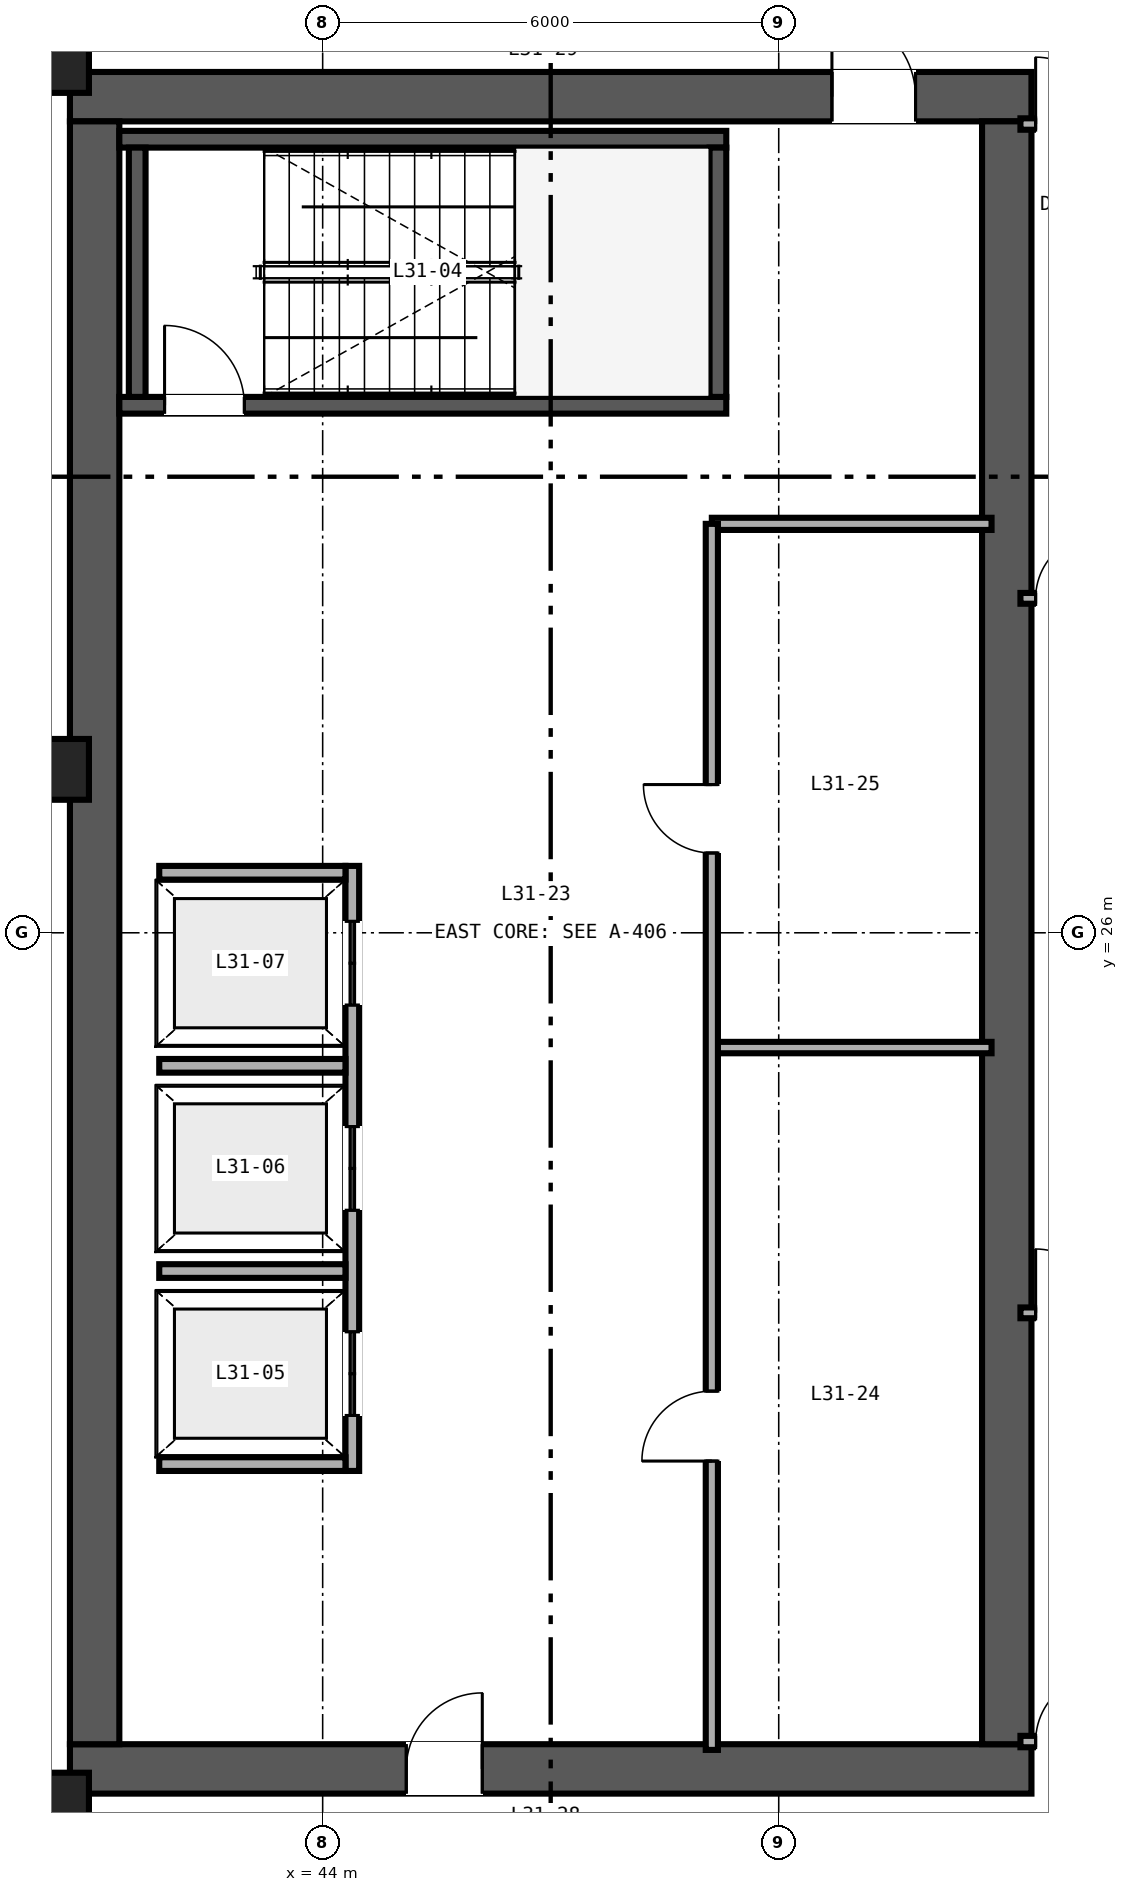
"""IFC4 building model, lengths in metres.
Left out: names, types, materials, properties, quantities, classifications, styles, units other than length and angle.
Written with IfcOpenShell. Run it as: python <this file> out.ifc"""

import sys

from ifc_helpers import new_model, si_unit, direction, frame, frame_2d, origin, origin_2d, place, context, subcontext, project, spatial, rectangle, hollow_rectangle, extrude, source, transform, mapped, element, fill, save


model = new_model("IFC4")
c1 = context("Model", 3, precision=1e-05, world=origin(), true_north=direction((0.0, 1.0)))
c2 = subcontext(c1, "Body", "Model", "MODEL_VIEW")
j1 = project(units=[si_unit("LENGTHUNIT", "METRE"), si_unit("PLANEANGLEUNIT", "RADIAN")], contexts=[c1])
p1 = place(None, origin())
s1 = spatial("IfcSite", under=j1, at=p1, CompositionType="ELEMENT")
p2 = place(p1, origin())
s2 = spatial("IfcBuilding", under=s1, at=p2, CompositionType="ELEMENT")
p3 = place(p2, frame((0.0, 0.0, 126.0)))
s3 = spatial("IfcBuildingStorey", under=s2, at=p3, CompositionType="ELEMENT", Elevation=126.0)
p4 = place(p3, frame((40.675, 15.0, 0.0), z_axis=(0.0, 0.0, 1.0), x_axis=(1.0, 0.0, 0.0)))
e1 = element("IfcWall", 1, at=p4, inside=s3, PredefinedType="SHEAR", context=c2, shape_type="SweptSolid", body=[
    extrude(rectangle(XDim=12.65, YDim=0.65, at=frame_2d((6.325, 0.0))), origin(), (0.0, 0.0, 1.0), 3.36),
])
p5 = place(p4, frame((4.425, 0.0, 0.0)))
e2 = element("IfcOpeningElement", 2, at=p5, cuts=e1, PredefinedType="OPENING", context=c2, shape_type="SweptSolid", body=[
    extrude(rectangle(XDim=1.0, YDim=2.15, at=frame_2d((0.5, 1.075))), frame((0.0, 0.335, 0.0), z_axis=(0.0, -1.0, 0.0), x_axis=(1.0, 0.0, 0.0)), (0.0, 0.0, 1.0), 0.67),
])
p6 = place(p3, frame((40.675, 37.0, 0.0), z_axis=(0.0, 0.0, 1.0), x_axis=(1.0, 0.0, 0.0)))
e3 = element("IfcWall", 3, at=p6, inside=s3, PredefinedType="SHEAR", context=c2, shape_type="SweptSolid", body=[
    extrude(rectangle(XDim=12.65, YDim=0.65, at=frame_2d((6.325, 0.0))), origin(), (0.0, 0.0, 1.0), 3.36),
])
p7 = place(p6, frame((10.025, 0.0, 0.0)))
e4 = element("IfcOpeningElement", 4, at=p7, cuts=e3, PredefinedType="OPENING", context=c2, shape_type="SweptSolid", body=[
    extrude(rectangle(XDim=1.1, YDim=2.15, at=frame_2d((0.55, 1.075))), frame((0.0, 0.335, 0.0), z_axis=(0.0, -1.0, 0.0), x_axis=(1.0, 0.0, 0.0)), (0.0, 0.0, 1.0), 0.67),
])
for number, where, z_axis, x_axis in (
    (5, (41.0, 15.325, 0.0), (0.0, 0.0, 1.0), (0.0, 1.0, 0.0)),
    (6, (53.0, 15.325, 0.0), (0.0, 0.0, 1.0), (0.0, 1.0, 0.0)),
):
    element("IfcWall", number, at=place(p3, frame(where, z_axis=z_axis, x_axis=x_axis)), inside=s3, PredefinedType="SHEAR", context=c2, shape_type="SweptSolid", body=[
        extrude(rectangle(XDim=21.35, YDim=0.65, at=frame_2d((10.675, 0.0))), origin(), (0.0, 0.0, 1.0), 3.36),
    ])
p8 = place(p3, frame((41.325, 32.94, 0.0), z_axis=(0.0, 0.0, 1.0), x_axis=(1.0, 0.0, 0.0)))
e7 = element("IfcWall", 7, at=p8, inside=s3, PredefinedType="SHEAR", context=c2, shape_type="SweptSolid", body=[
    extrude(rectangle(XDim=7.985, YDim=0.22, at=frame_2d((3.993, 0.0))), origin(), (0.0, 0.0, 1.0), 3.4),
])
p9 = place(p8, frame((0.595, 0.0, 0.0)))
e8 = element("IfcOpeningElement", 8, at=p9, cuts=e7, PredefinedType="OPENING", context=c2, shape_type="SweptSolid", body=[
    extrude(rectangle(XDim=1.05, YDim=2.15, at=frame_2d((0.525, 1.075))), frame((0.0, 0.12, 0.0), z_axis=(0.0, -1.0, 0.0), x_axis=(1.0, 0.0, 0.0)), (0.0, 0.0, 1.0), 0.24),
])
p10 = place(p3, frame((41.325, 36.44, 0.0), z_axis=(0.0, 0.0, 1.0), x_axis=(1.0, 0.0, 0.0)))
e9 = element("IfcWall", 9, at=p10, inside=s3, PredefinedType="SHEAR", context=c2, shape_type="SweptSolid", body=[
    extrude(rectangle(XDim=7.985, YDim=0.22, at=frame_2d((3.993, 0.0))), origin(), (0.0, 0.0, 1.0), 3.4),
])
for number, where, z_axis, x_axis in (
    (10, (41.56, 33.05, 0.0), (0.0, 0.0, 1.0), (0.0, 1.0, 0.0)),
    (11, (49.2, 33.05, 0.0), (0.0, 0.0, 1.0), (0.0, 1.0, 0.0)),
):
    element("IfcWall", number, at=place(p3, frame(where, z_axis=z_axis, x_axis=x_axis)), inside=s3, PredefinedType="SHEAR", context=c2, shape_type="SweptSolid", body=[
        extrude(rectangle(XDim=3.28, YDim=0.22, at=frame_2d((1.64, 0.0))), origin(), (0.0, 0.0, 1.0), 3.4),
    ])
m1 = source(origin(), c2, "Body", "SweptSolid", [
    extrude(hollow_rectangle(XDim=0.85, YDim=0.8, WallThickness=0.032, at=origin_2d()), origin(), (0.0, 0.0, 1.0), 3.36),
])
for number, where, z_axis, x_axis in (
    (12, (40.5, 14.55, 0.0), (0.0, 0.0, 1.0), (1.0, 0.0, 0.0)),
    (13, (40.5, 28.15, 0.0), (0.0, 0.0, 1.0), (1.0, 0.0, 0.0)),
    (14, (40.5, 37.45, 0.0), (0.0, 0.0, 1.0), (1.0, 0.0, 0.0)),
):
    element("IfcColumn", number, at=place(p3, frame(where, z_axis=z_axis, x_axis=x_axis)), inside=s3, PredefinedType="COLUMN", context=c2, shape_type="MappedRepresentation", body=[
        mapped(m1, transform((0.0, 0.0, 0.0), scale=1.0)),
    ])
p11 = place(p3, frame((44.39, 18.92, 0.0), z_axis=(0.0, 0.0, 1.0), x_axis=(0.0, 1.0, 0.0)))
e15 = element("IfcWall", 15, at=p11, inside=s3, PredefinedType="SOLIDWALL", context=c2, shape_type="SweptSolid", body=[
    extrude(rectangle(XDim=7.96, YDim=0.18, at=frame_2d((3.98, 0.0))), origin(), (0.0, 0.0, 1.0), 3.36),
])
p12 = place(p11, frame((0.73, 0.0, 0.0)))
e16 = element("IfcOpeningElement", 16, at=p12, cuts=e15, PredefinedType="OPENING", context=c2, shape_type="SweptSolid", body=[
    extrude(rectangle(XDim=1.1, YDim=2.2, at=frame_2d((0.55, 1.1))), frame((0.0, 0.1, 0.0), z_axis=(0.0, -1.0, 0.0), x_axis=(1.0, 0.0, 0.0)), (0.0, 0.0, 1.0), 0.2),
])
p13 = place(p11, frame((3.43, 0.0, 0.0)))
e17 = element("IfcOpeningElement", 17, at=p13, cuts=e15, PredefinedType="OPENING", context=c2, shape_type="SweptSolid", body=[
    extrude(rectangle(XDim=1.1, YDim=2.2, at=frame_2d((0.55, 1.1))), frame((0.0, 0.1, 0.0), z_axis=(0.0, -1.0, 0.0), x_axis=(1.0, 0.0, 0.0)), (0.0, 0.0, 1.0), 0.2),
])
p14 = place(p11, frame((6.13, 0.0, 0.0)))
e18 = element("IfcOpeningElement", 18, at=p14, cuts=e15, PredefinedType="OPENING", context=c2, shape_type="SweptSolid", body=[
    extrude(rectangle(XDim=1.1, YDim=2.2, at=frame_2d((0.55, 1.1))), frame((0.0, 0.1, 0.0), z_axis=(0.0, -1.0, 0.0), x_axis=(1.0, 0.0, 0.0)), (0.0, 0.0, 1.0), 0.2),
])
for number, where, z_axis, x_axis in (
    (19, (41.85, 19.01, 0.0), (0.0, 0.0, 1.0), (1.0, 0.0, 0.0)),
    (20, (41.85, 26.79, 0.0), (0.0, 0.0, 1.0), (1.0, 0.0, 0.0)),
    (21, (41.85, 21.55, 0.0), (0.0, 0.0, 1.0), (1.0, 0.0, 0.0)),
    (22, (41.85, 24.25, 0.0), (0.0, 0.0, 1.0), (1.0, 0.0, 0.0)),
):
    element("IfcWall", number, at=place(p3, frame(where, z_axis=z_axis, x_axis=x_axis)), inside=s3, PredefinedType="SOLIDWALL", context=c2, shape_type="SweptSolid", body=[
        extrude(rectangle(XDim=2.45, YDim=0.18, at=frame_2d((1.225, 0.0))), origin(), (0.0, 0.0, 1.0), 3.36),
    ])
p15 = place(p3, frame((49.12, 31.38, 0.0), z_axis=(0.0, 0.0, 1.0), x_axis=(1.0, 0.0, 0.0)))
e23 = element("IfcWall", 23, at=p15, inside=s3, PredefinedType="PARTITIONING", context=c2, shape_type="SweptSolid", body=[
    extrude(rectangle(XDim=3.68, YDim=0.16, at=frame_2d((1.84, 0.0))), origin(), (0.0, 0.0, 1.0), 2.36),
])
p16 = place(p3, frame((49.12, 24.49, 0.0), z_axis=(0.0, 0.0, 1.0), x_axis=(1.0, 0.0, 0.0)))
e24 = element("IfcWall", 24, at=p16, inside=s3, PredefinedType="PARTITIONING", context=c2, shape_type="SweptSolid", body=[
    extrude(rectangle(XDim=3.68, YDim=0.15, at=frame_2d((1.84, 0.0))), origin(), (0.0, 0.0, 1.0), 3.36),
])
p17 = place(p3, frame((49.12, 15.25, 0.0), z_axis=(0.0, 0.0, 1.0), x_axis=(0.0, 1.0, 0.0)))
e25 = element("IfcWall", 25, at=p17, inside=s3, PredefinedType="PARTITIONING", context=c2, shape_type="SweptSolid", body=[
    extrude(rectangle(XDim=16.13, YDim=0.16, at=frame_2d((8.065, 0.0))), origin(), (0.0, 0.0, 1.0), 2.36),
])
p18 = place(p17, frame((3.8, 0.0, 0.0)))
e26 = element("IfcOpeningElement", 26, at=p18, cuts=e25, PredefinedType="OPENING", context=c2, shape_type="SweptSolid", body=[
    extrude(rectangle(XDim=0.92, YDim=2.15, at=frame_2d((0.46, 1.075))), frame((0.0, 0.09, 0.0), z_axis=(0.0, -1.0, 0.0), x_axis=(1.0, 0.0, 0.0)), (0.0, 0.0, 1.0), 0.18),
])
p19 = place(p17, frame((11.8, 0.0, 0.0)))
e27 = element("IfcOpeningElement", 27, at=p19, cuts=e25, PredefinedType="OPENING", context=c2, shape_type="SweptSolid", body=[
    extrude(rectangle(XDim=0.9, YDim=2.15, at=frame_2d((0.45, 1.075))), frame((0.0, 0.09, 0.0), z_axis=(0.0, -1.0, 0.0), x_axis=(1.0, 0.0, 0.0)), (0.0, 0.0, 1.0), 0.18),
])
p20 = place(p3, frame((53.18, 15.36, 0.0), z_axis=(0.0, 0.0, 1.0), x_axis=(1.0, 0.0, 0.0)))
e28 = element("IfcWall", 28, at=p20, inside=s3, PredefinedType="PARTITIONING", context=c2, shape_type="SweptSolid", body=[
    extrude(rectangle(XDim=2.66, YDim=0.15, at=frame_2d((1.33, 0.0))), origin(), (0.0, 0.0, 1.0), 2.581),
])
p21 = place(p20, frame((0.2, 0.0, 0.0)))
e29 = element("IfcOpeningElement", 29, at=p21, cuts=e28, PredefinedType="OPENING", context=c2, shape_type="SweptSolid", body=[
    extrude(rectangle(XDim=0.88, YDim=2.15, at=frame_2d((0.44, 1.075))), frame((0.0, 0.085, 0.0), z_axis=(0.0, -1.0, 0.0), x_axis=(1.0, 0.0, 0.0)), (0.0, 0.0, 1.0), 0.17),
])
p22 = place(p3, frame((53.18, 36.64, 0.0), z_axis=(0.0, 0.0, 1.0), x_axis=(1.0, 0.0, 0.0)))
e30 = element("IfcWall", 30, at=p22, inside=s3, PredefinedType="PARTITIONING", context=c2, shape_type="SweptSolid", body=[
    extrude(rectangle(XDim=2.66, YDim=0.15, at=frame_2d((1.33, 0.0))), origin(), (0.0, 0.0, 1.0), 2.743),
])
p23 = place(p22, frame((0.2, 0.0, 0.0)))
e31 = element("IfcOpeningElement", 31, at=p23, cuts=e30, PredefinedType="OPENING", context=c2, shape_type="SweptSolid", body=[
    extrude(rectangle(XDim=0.88, YDim=2.15, at=frame_2d((0.44, 1.075))), frame((0.0, 0.085, 0.0), z_axis=(0.0, -1.0, 0.0), x_axis=(1.0, 0.0, 0.0)), (0.0, 0.0, 1.0), 0.17),
])
p24 = place(p3, frame((53.18, 21.0, 0.0), z_axis=(0.0, 0.0, 1.0), x_axis=(1.0, 0.0, 0.0)))
e32 = element("IfcWall", 32, at=p24, inside=s3, PredefinedType="PARTITIONING", context=c2, shape_type="SweptSolid", body=[
    extrude(rectangle(XDim=2.66, YDim=0.142, at=frame_2d((1.33, 0.0))), origin(), (0.0, 0.0, 1.0), 2.581),
])
p25 = place(p24, frame((0.2, 0.0, 0.0)))
e33 = element("IfcOpeningElement", 33, at=p25, cuts=e32, PredefinedType="OPENING", context=c2, shape_type="SweptSolid", body=[
    extrude(rectangle(XDim=0.84, YDim=2.1, at=frame_2d((0.42, 1.05))), frame((0.0, 0.081, 0.0), z_axis=(0.0, -1.0, 0.0), x_axis=(1.0, 0.0, 0.0)), (0.0, 0.0, 1.0), 0.162),
])
p26 = place(p3, frame((53.18, 30.4, 0.0), z_axis=(0.0, 0.0, 1.0), x_axis=(1.0, 0.0, 0.0)))
e34 = element("IfcWall", 34, at=p26, inside=s3, PredefinedType="PARTITIONING", context=c2, shape_type="SweptSolid", body=[
    extrude(rectangle(XDim=2.66, YDim=0.142, at=frame_2d((1.33, 0.0))), origin(), (0.0, 0.0, 1.0), 2.743),
])
p27 = place(p26, frame((0.2, 0.0, 0.0)))
e35 = element("IfcOpeningElement", 35, at=p27, cuts=e34, PredefinedType="OPENING", context=c2, shape_type="SweptSolid", body=[
    extrude(rectangle(XDim=0.84, YDim=2.1, at=frame_2d((0.42, 1.05))), frame((0.0, 0.081, 0.0), z_axis=(0.0, -1.0, 0.0), x_axis=(1.0, 0.0, 0.0)), (0.0, 0.0, 1.0), 0.162),
])
m2 = source(origin(), c2, "Body", "SweptSolid", [
    extrude(rectangle(XDim=1.05, YDim=2.15, at=frame_2d((0.525, 1.075))), frame((0.0, 0.025, 0.0), z_axis=(0.0, -1.0, 0.0), x_axis=(1.0, 0.0, 0.0)), (0.0, 0.0, 1.0), 0.05),
])
p28 = place(p9, origin())
e36 = element("IfcDoor", 36, at=p28, inside=s3, OperationType="SINGLE_SWING_LEFT", PredefinedType="DOOR", context=c2, shape_type="MappedRepresentation", body=[
    mapped(m2, transform((0.0, 0.0, 0.0), scale=1.0)),
])
fill(e8, e36)
m3 = source(origin(), c2, "Body", "SweptSolid", [
    extrude(rectangle(XDim=1.1, YDim=2.2, at=frame_2d((0.55, 1.1))), frame((0.0, 0.025, 0.0), z_axis=(0.0, -1.0, 0.0), x_axis=(1.0, 0.0, 0.0)), (0.0, 0.0, 1.0), 0.05),
])
p29 = place(p12, origin())
e37 = element("IfcDoor", 37, at=p29, inside=s3, OperationType="DOUBLE_DOOR_SLIDING", PredefinedType="DOOR", context=c2, shape_type="MappedRepresentation", body=[
    mapped(m3, transform((0.0, 0.0, 0.0), scale=1.0)),
])
fill(e16, e37)
p30 = place(p13, origin())
e38 = element("IfcDoor", 38, at=p30, inside=s3, OperationType="DOUBLE_DOOR_SLIDING", PredefinedType="DOOR", context=c2, shape_type="MappedRepresentation", body=[
    mapped(m3, transform((0.0, 0.0, 0.0), scale=1.0)),
])
fill(e17, e38)
p31 = place(p14, origin())
e39 = element("IfcDoor", 39, at=p31, inside=s3, OperationType="DOUBLE_DOOR_SLIDING", PredefinedType="DOOR", context=c2, shape_type="MappedRepresentation", body=[
    mapped(m3, transform((0.0, 0.0, 0.0), scale=1.0)),
])
fill(e18, e39)
m4 = source(origin(), c2, "Body", "SweptSolid", [
    extrude(rectangle(XDim=1.0, YDim=2.15, at=frame_2d((0.5, 1.075))), frame((0.0, 0.025, 0.0), z_axis=(0.0, -1.0, 0.0), x_axis=(1.0, 0.0, 0.0)), (0.0, 0.0, 1.0), 0.05),
])
p32 = place(p5, origin())
e40 = element("IfcDoor", 40, at=p32, inside=s3, OperationType="SINGLE_SWING_RIGHT", PredefinedType="DOOR", context=c2, shape_type="MappedRepresentation", body=[
    mapped(m4, transform((0.0, 0.0, 0.0), scale=1.0)),
])
fill(e2, e40)
m5 = source(origin(), c2, "Body", "SweptSolid", [
    extrude(rectangle(XDim=1.1, YDim=2.15, at=frame_2d((0.55, 1.075))), frame((0.0, 0.025, 0.0), z_axis=(0.0, -1.0, 0.0), x_axis=(1.0, 0.0, 0.0)), (0.0, 0.0, 1.0), 0.05),
])
p33 = place(p7, origin())
e41 = element("IfcDoor", 41, at=p33, inside=s3, OperationType="SINGLE_SWING_LEFT", PredefinedType="DOOR", context=c2, shape_type="MappedRepresentation", body=[
    mapped(m5, transform((0.0, 0.0, 0.0), scale=1.0)),
])
fill(e4, e41)
m6 = source(origin(), c2, "Body", "SweptSolid", [
    extrude(rectangle(XDim=0.92, YDim=2.15, at=frame_2d((0.46, 1.075))), frame((0.0, 0.025, 0.0), z_axis=(0.0, -1.0, 0.0), x_axis=(1.0, 0.0, 0.0)), (0.0, 0.0, 1.0), 0.05),
])
p34 = place(p18, origin())
e42 = element("IfcDoor", 42, at=p34, inside=s3, OperationType="SINGLE_SWING_LEFT", PredefinedType="DOOR", context=c2, shape_type="MappedRepresentation", body=[
    mapped(m6, transform((0.0, 0.0, 0.0), scale=1.0)),
])
fill(e26, e42)
m7 = source(origin(), c2, "Body", "SweptSolid", [
    extrude(rectangle(XDim=0.9, YDim=2.15, at=frame_2d((0.45, 1.075))), frame((0.0, 0.025, 0.0), z_axis=(0.0, -1.0, 0.0), x_axis=(1.0, 0.0, 0.0)), (0.0, 0.0, 1.0), 0.05),
])
p35 = place(p19, origin())
e43 = element("IfcDoor", 43, at=p35, inside=s3, OperationType="SINGLE_SWING_RIGHT", PredefinedType="DOOR", context=c2, shape_type="MappedRepresentation", body=[
    mapped(m7, transform((0.0, 0.0, 0.0), scale=1.0)),
])
fill(e27, e43)
m8 = source(origin(), c2, "Body", "SweptSolid", [
    extrude(rectangle(XDim=0.88, YDim=2.15, at=frame_2d((0.44, 1.075))), frame((0.0, 0.025, 0.0), z_axis=(0.0, -1.0, 0.0), x_axis=(1.0, 0.0, 0.0)), (0.0, 0.0, 1.0), 0.05),
])
p36 = place(p21, origin())
e44 = element("IfcDoor", 44, at=p36, inside=s3, OperationType="SINGLE_SWING_RIGHT", PredefinedType="DOOR", context=c2, shape_type="MappedRepresentation", body=[
    mapped(m8, transform((0.0, 0.0, 0.0), scale=1.0)),
])
fill(e29, e44)
p37 = place(p23, origin())
e45 = element("IfcDoor", 45, at=p37, inside=s3, OperationType="SINGLE_SWING_LEFT", PredefinedType="DOOR", context=c2, shape_type="MappedRepresentation", body=[
    mapped(m8, transform((0.0, 0.0, 0.0), scale=1.0)),
])
fill(e31, e45)
m9 = source(origin(), c2, "Body", "SweptSolid", [
    extrude(rectangle(XDim=0.84, YDim=2.1, at=frame_2d((0.42, 1.05))), frame((0.0, 0.025, 0.0), z_axis=(0.0, -1.0, 0.0), x_axis=(1.0, 0.0, 0.0)), (0.0, 0.0, 1.0), 0.05),
])
p38 = place(p25, origin())
e46 = element("IfcDoor", 46, at=p38, inside=s3, OperationType="SINGLE_SWING_LEFT", PredefinedType="DOOR", context=c2, shape_type="MappedRepresentation", body=[
    mapped(m9, transform((0.0, 0.0, 0.0), scale=1.0)),
])
fill(e33, e46)
p39 = place(p27, origin())
e47 = element("IfcDoor", 47, at=p39, inside=s3, OperationType="SINGLE_SWING_RIGHT", PredefinedType="DOOR", context=c2, shape_type="MappedRepresentation", body=[
    mapped(m9, transform((0.0, 0.0, 0.0), scale=1.0)),
])
fill(e35, e47)
save(model, sys.argv[1])
